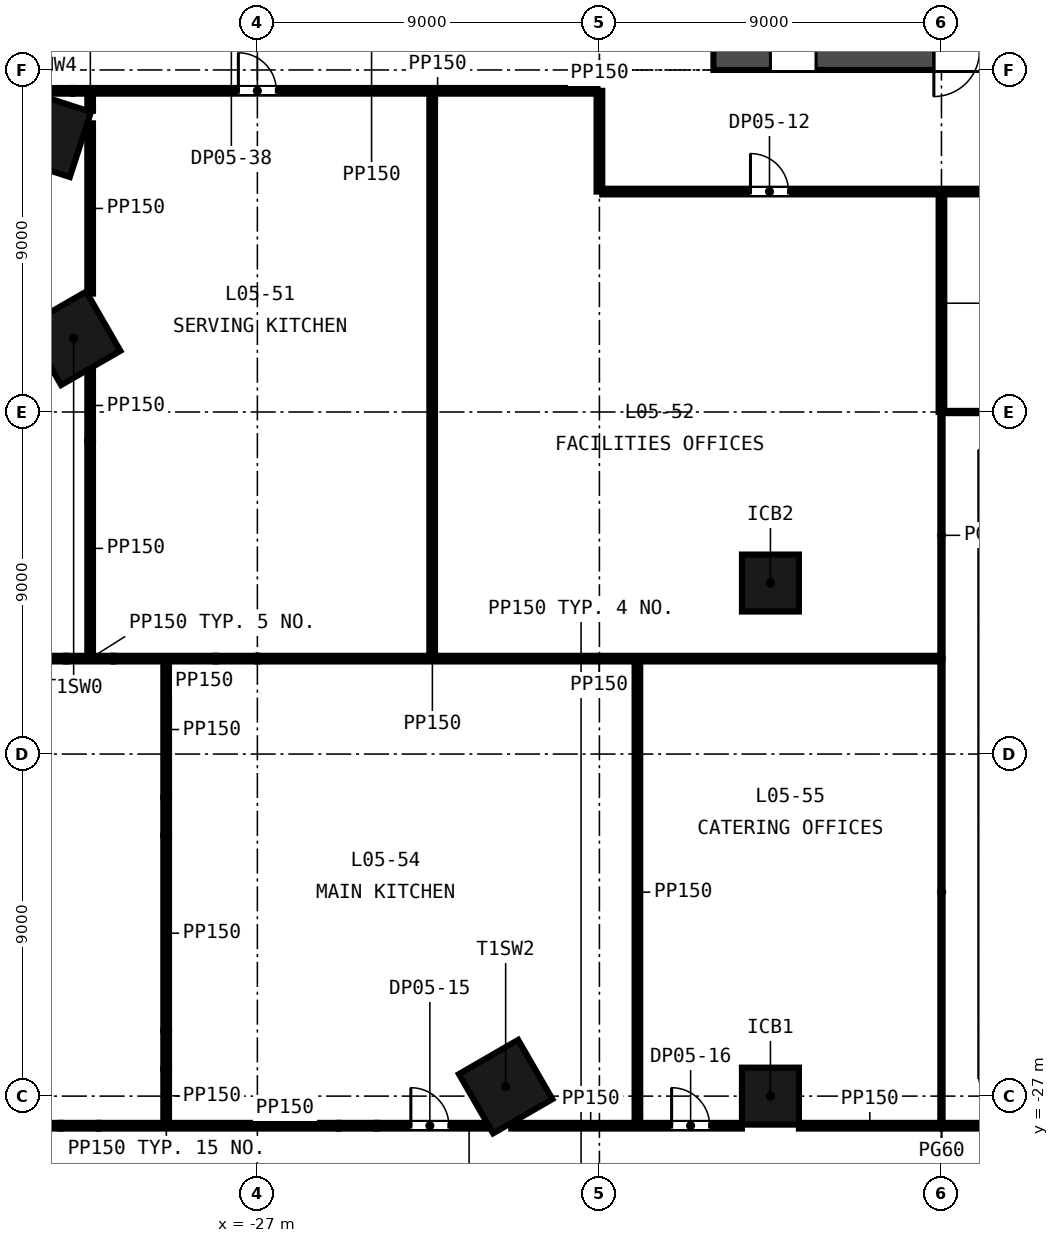
"""IFC4 building model, lengths in metres.
Left out: names, types, materials, properties, quantities, classifications, styles, units other than length and angle.
Written with IfcOpenShell. Run it as: python <this file> out.ifc"""

import sys

from ifc_helpers import new_model, si_unit, direction, frame, frame_2d, origin, origin_2d, place, context, subcontext, project, spatial, rectangle, extrude, element, fill, save


model = new_model("IFC4")
c1 = context("Model", 3, precision=1e-05, world=origin(), true_north=direction((0.0, 1.0)))
c2 = subcontext(c1, "Body", "Model", "MODEL_VIEW")
j1 = project(units=[si_unit("LENGTHUNIT", "METRE"), si_unit("PLANEANGLEUNIT", "RADIAN")], contexts=[c1])
p1 = place(None, origin())
s1 = spatial("IfcSite", under=j1, at=p1, CompositionType="ELEMENT")
p2 = place(p1, origin())
s2 = spatial("IfcBuilding", under=s1, at=p2, CompositionType="ELEMENT")
p3 = place(p2, frame((0.0, 0.0, 31.5)))
s3 = spatial("IfcBuildingStorey", under=s2, at=p3, CompositionType="ELEMENT", Elevation=31.5)
p4 = place(p3, frame((-15.0, 0.5, -0.3), z_axis=(0.0, 0.0, 1.0), x_axis=(1.0, 0.0, 0.0)))
e1 = element("IfcWall", 1, at=p4, inside=s3, PredefinedType="SOLIDWALL", context=c2, shape_type="SweptSolid", body=[
    extrude(rectangle(XDim=30.0, YDim=1.0, at=frame_2d((15.0, 0.0))), origin(), (0.0, 0.0, 1.0), 4.65),
])
p5 = place(p4, frame((5.8, 0.0, 0.3)))
e2 = element("IfcOpeningElement", 2, at=p5, cuts=e1, PredefinedType="OPENING", context=c2, shape_type="SweptSolid", body=[
    extrude(rectangle(XDim=2.4, YDim=2.4, at=frame_2d((1.2, 1.2))), frame((0.0, 0.51, 0.0), z_axis=(0.0, -1.0, 0.0), x_axis=(1.0, 0.0, 0.0)), (0.0, 0.0, 1.0), 1.02),
])
p6 = place(p4, frame((13.8, 0.0, 0.3)))
e3 = element("IfcOpeningElement", 3, at=p6, cuts=e1, PredefinedType="OPENING", context=c2, shape_type="SweptSolid", body=[
    extrude(rectangle(XDim=2.4, YDim=2.4, at=frame_2d((1.2, 1.2))), frame((0.0, 0.51, 0.0), z_axis=(0.0, -1.0, 0.0), x_axis=(1.0, 0.0, 0.0)), (0.0, 0.0, 1.0), 1.02),
])
p7 = place(p4, frame((21.8, 0.0, 0.3)))
e4 = element("IfcOpeningElement", 4, at=p7, cuts=e1, PredefinedType="OPENING", context=c2, shape_type="SweptSolid", body=[
    extrude(rectangle(XDim=2.4, YDim=2.4, at=frame_2d((1.2, 1.2))), frame((0.0, 0.51, 0.0), z_axis=(0.0, -1.0, 0.0), x_axis=(1.0, 0.0, 0.0)), (0.0, 0.0, 1.0), 1.02),
])
p8 = place(p4, frame((1.5, 0.0, 0.3)))
e5 = element("IfcOpeningElement", 5, at=p8, cuts=e1, PredefinedType="OPENING", context=c2, shape_type="SweptSolid", body=[
    extrude(rectangle(XDim=1.2, YDim=2.1, at=frame_2d((0.6, 1.05))), frame((0.0, 0.51, 0.0), z_axis=(0.0, -1.0, 0.0), x_axis=(1.0, 0.0, 0.0)), (0.0, 0.0, 1.0), 1.02),
])
p9 = place(p4, frame((27.3, 0.0, 0.3)))
e6 = element("IfcOpeningElement", 6, at=p9, cuts=e1, PredefinedType="OPENING", context=c2, shape_type="SweptSolid", body=[
    extrude(rectangle(XDim=1.2, YDim=2.1, at=frame_2d((0.6, 1.05))), frame((0.0, 0.51, 0.0), z_axis=(0.0, -1.0, 0.0), x_axis=(1.0, 0.0, 0.0)), (0.0, 0.0, 1.0), 1.02),
])
for number, where, z_axis, x_axis in (
    (7, (-32.512, -1.683, -0.3), (0.0, 0.0, 1.0), (-0.309, -0.951, 0.0)),
    (8, (-31.834, -7.061, -0.3), (0.0, 0.0, 1.0), (0.5, -0.866, 0.0)),
    (9, (-20.467, -26.75, -0.3), (0.0, 0.0, 1.0), (0.5, -0.866, 0.0)),
):
    element("IfcColumn", number, at=place(p3, frame(where, z_axis=z_axis, x_axis=x_axis)), inside=s3, PredefinedType="COLUMN", context=c2, shape_type="SweptSolid", body=[
        extrude(rectangle(XDim=1.8, YDim=1.8, at=origin_2d()), origin(), (0.0, 0.0, 1.0), 4.65),
    ])
for number, where, z_axis, x_axis in (
    (10, (-13.5, -27.0, -0.3), (0.0, 0.0, 1.0), (1.0, 0.0, 0.0)),
    (11, (-13.5, -13.5, -0.3), (0.0, 0.0, 1.0), (1.0, 0.0, 0.0)),
):
    element("IfcColumn", number, at=place(p3, frame(where, z_axis=z_axis, x_axis=x_axis)), inside=s3, PredefinedType="COLUMN", context=c2, shape_type="SweptSolid", body=[
        extrude(rectangle(XDim=1.5, YDim=1.5, at=origin_2d()), origin(), (0.0, 0.0, 1.0), 4.65),
    ])
p10 = place(p3, frame((-41.074, -27.779, 0.0), z_axis=(0.0, 0.0, 1.0), x_axis=(1.0, 0.0, 0.0)))
e12 = element("IfcWall", 12, at=p10, inside=s3, PredefinedType="PARTITIONING", context=c2, shape_type="SweptSolid", body=[
    extrude(rectangle(XDim=8.898, YDim=0.15, at=frame_2d((4.449, 0.0))), origin(), (0.0, 0.0, 1.0), 4.35),
])
p11 = place(p10, frame((4.65, 0.0, 0.0)))
e13 = element("IfcOpeningElement", 13, at=p11, cuts=e12, PredefinedType="OPENING", context=c2, shape_type="SweptSolid", body=[
    extrude(rectangle(XDim=1.8, YDim=2.4, at=frame_2d((0.9, 1.2))), frame((0.0, 0.085, 0.0), z_axis=(0.0, -1.0, 0.0), x_axis=(1.0, 0.0, 0.0)), (0.0, 0.0, 1.0), 0.17),
])
p12 = place(p3, frame((-32.176, -27.779, 0.0), z_axis=(0.0, 0.0, 1.0), x_axis=(1.0, 0.0, 0.0)))
e14 = element("IfcWall", 14, at=p12, inside=s3, PredefinedType="PARTITIONING", context=c2, shape_type="SweptSolid", body=[
    extrude(rectangle(XDim=1.0, YDim=0.15, at=frame_2d((0.5, 0.0))), origin(), (0.0, 0.0, 1.0), 3.261),
])
p13 = place(p3, frame((-31.176, -27.779, 0.0), z_axis=(0.0, 0.0, 1.0), x_axis=(1.0, 0.0, 0.0)))
e15 = element("IfcWall", 15, at=p13, inside=s3, PredefinedType="PARTITIONING", context=c2, shape_type="SweptSolid", body=[
    extrude(rectangle(XDim=6.314, YDim=0.15, at=frame_2d((3.157, 0.0))), origin(), (0.0, 0.0, 1.0), 4.35),
])
p14 = place(p3, frame((-24.862, -27.779, 0.0), z_axis=(0.0, 0.0, 1.0), x_axis=(1.0, 0.0, 0.0)))
e16 = element("IfcWall", 16, at=p14, inside=s3, PredefinedType="PARTITIONING", context=c2, shape_type="SweptSolid", body=[
    extrude(rectangle(XDim=1.0, YDim=0.15, at=frame_2d((0.5, 0.0))), origin(), (0.0, 0.0, 1.0), 3.436),
])
p15 = place(p3, frame((-23.862, -27.779, 0.0), z_axis=(0.0, 0.0, 1.0), x_axis=(1.0, 0.0, 0.0)))
e17 = element("IfcWall", 17, at=p15, inside=s3, PredefinedType="PARTITIONING", context=c2, shape_type="SweptSolid", body=[
    extrude(rectangle(XDim=2.906, YDim=0.15, at=frame_2d((1.453, 0.0))), origin(), (0.0, 0.0, 1.0), 4.35),
])
p16 = place(p15, frame((0.9, 0.0, 0.0)))
e18 = element("IfcOpeningElement", 18, at=p16, cuts=e17, PredefinedType="OPENING", context=c2, shape_type="SweptSolid", body=[
    extrude(rectangle(XDim=1.0, YDim=2.1, at=frame_2d((0.5, 1.05))), frame((0.0, 0.085, 0.0), z_axis=(0.0, -1.0, 0.0), x_axis=(1.0, 0.0, 0.0)), (0.0, 0.0, 1.0), 0.17),
])
p17 = place(p3, frame((-20.319, -27.779, 0.0), z_axis=(0.0, 0.0, 1.0), x_axis=(1.0, 0.0, 0.0)))
e19 = element("IfcWall", 19, at=p17, inside=s3, PredefinedType="PARTITIONING", context=c2, shape_type="SweptSolid", body=[
    extrude(rectangle(XDim=6.069, YDim=0.15, at=frame_2d((3.035, 0.0))), origin(), (0.0, 0.0, 1.0), 4.35),
])
p18 = place(p17, frame((4.219, 0.0, 0.0)))
e20 = element("IfcOpeningElement", 20, at=p18, cuts=e19, PredefinedType="OPENING", context=c2, shape_type="SweptSolid", body=[
    extrude(rectangle(XDim=1.0, YDim=2.1, at=frame_2d((0.5, 1.05))), frame((0.0, 0.085, 0.0), z_axis=(0.0, -1.0, 0.0), x_axis=(1.0, 0.0, 0.0)), (0.0, 0.0, 1.0), 0.17),
])
p19 = place(p3, frame((-12.75, -27.779, 0.0), z_axis=(0.0, 0.0, 1.0), x_axis=(1.0, 0.0, 0.0)))
e21 = element("IfcWall", 21, at=p19, inside=s3, PredefinedType="PARTITIONING", context=c2, shape_type="SweptSolid", body=[
    extrude(rectangle(XDim=3.72, YDim=0.15, at=frame_2d((1.86, 0.0))), origin(), (0.0, 0.0, 1.0), 4.35),
])
p20 = place(p3, frame((-8.97, -27.779, 0.0), z_axis=(0.0, 0.0, 1.0), x_axis=(1.0, 0.0, 0.0)))
e22 = element("IfcWall", 22, at=p20, inside=s3, PredefinedType="PARTITIONING", context=c2, shape_type="SweptSolid", body=[
    extrude(rectangle(XDim=8.22, YDim=0.15, at=frame_2d((4.11, 0.0))), origin(), (0.0, 0.0, 1.0), 4.35),
])
p21 = place(p3, frame((-44.932, -15.489, 0.0), z_axis=(0.0, 0.0, 1.0), x_axis=(1.0, 0.0, 0.0)))
e23 = element("IfcWall", 23, at=p21, inside=s3, PredefinedType="PARTITIONING", context=c2, shape_type="SweptSolid", body=[
    extrude(rectangle(XDim=12.901, YDim=0.15, at=frame_2d((6.451, 0.0))), origin(), (0.0, 0.0, 1.0), 4.35),
])
p22 = place(p3, frame((-32.031, -15.489, 0.0), z_axis=(0.0, 0.0, 1.0), x_axis=(1.0, 0.0, 0.0)))
e24 = element("IfcWall", 24, at=p22, inside=s3, PredefinedType="PARTITIONING", context=c2, shape_type="SweptSolid", body=[
    extrude(rectangle(XDim=1.244, YDim=0.15, at=frame_2d((0.622, 0.0))), origin(), (0.0, 0.0, 1.0), 3.261),
])
p23 = place(p3, frame((-30.787, -15.489, 0.0), z_axis=(0.0, 0.0, 1.0), x_axis=(1.0, 0.0, 0.0)))
e25 = element("IfcWall", 25, at=p23, inside=s3, PredefinedType="PARTITIONING", context=c2, shape_type="SweptSolid", body=[
    extrude(rectangle(XDim=2.692, YDim=0.15, at=frame_2d((1.346, 0.0))), origin(), (0.0, 0.0, 1.0), 4.35),
])
p24 = place(p3, frame((-28.094, -15.489, 0.0), z_axis=(0.0, 0.0, 1.0), x_axis=(1.0, 0.0, 0.0)))
e26 = element("IfcWall", 26, at=p24, inside=s3, PredefinedType="PARTITIONING", context=c2, shape_type="SweptSolid", body=[
    extrude(rectangle(XDim=1.097, YDim=0.15, at=frame_2d((0.548, 0.0))), origin(), (0.0, 0.0, 1.0), 3.5),
])
p25 = place(p3, frame((-26.998, -15.489, 0.0), z_axis=(0.0, 0.0, 1.0), x_axis=(1.0, 0.0, 0.0)))
e27 = element("IfcWall", 27, at=p25, inside=s3, PredefinedType="PARTITIONING", context=c2, shape_type="SweptSolid", body=[
    extrude(rectangle(XDim=17.968, YDim=0.15, at=frame_2d((8.984, 0.0))), origin(), (0.0, 0.0, 1.0), 4.35),
])
p26 = place(p3, frame((-8.925, -9.0, 0.0), z_axis=(0.0, 0.0, 1.0), x_axis=(1.0, 0.0, 0.0)))
e28 = element("IfcWall", 28, at=p26, inside=s3, PredefinedType="PARTITIONING", context=c2, shape_type="SweptSolid", body=[
    extrude(rectangle(XDim=6.3, YDim=0.06, at=frame_2d((3.15, 0.0))), origin(), (0.0, 0.0, 1.0), 4.35),
])
p27 = place(p3, frame((-17.925, -3.2, 0.0), z_axis=(0.0, 0.0, 1.0), x_axis=(1.0, 0.0, 0.0)))
e29 = element("IfcWall", 29, at=p27, inside=s3, PredefinedType="PARTITIONING", context=c2, shape_type="SweptSolid", body=[
    extrude(rectangle(XDim=50.906, YDim=0.15, at=frame_2d((25.453, 0.0))), origin(), (0.0, 0.0, 1.0), 4.35),
])
p28 = place(p27, frame((3.9, 0.0, 0.0)))
e30 = element("IfcOpeningElement", 30, at=p28, cuts=e29, PredefinedType="OPENING", context=c2, shape_type="SweptSolid", body=[
    extrude(rectangle(XDim=1.0, YDim=2.1, at=frame_2d((0.5, 1.05))), frame((0.0, 0.085, 0.0), z_axis=(0.0, -1.0, 0.0), x_axis=(1.0, 0.0, 0.0)), (0.0, 0.0, 1.0), 0.17),
])
p29 = place(p27, frame((28.575, 0.0, 0.0)))
e31 = element("IfcOpeningElement", 31, at=p29, cuts=e29, PredefinedType="OPENING", context=c2, shape_type="SweptSolid", body=[
    extrude(rectangle(XDim=1.0, YDim=2.1, at=frame_2d((0.5, 1.05))), frame((0.0, 0.085, 0.0), z_axis=(0.0, -1.0, 0.0), x_axis=(1.0, 0.0, 0.0)), (0.0, 0.0, 1.0), 0.17),
])
p30 = place(p27, frame((42.825, 0.0, 0.0)))
e32 = element("IfcOpeningElement", 32, at=p30, cuts=e29, PredefinedType="OPENING", context=c2, shape_type="SweptSolid", body=[
    extrude(rectangle(XDim=1.0, YDim=2.1, at=frame_2d((0.5, 1.05))), frame((0.0, 0.085, 0.0), z_axis=(0.0, -1.0, 0.0), x_axis=(1.0, 0.0, 0.0)), (0.0, 0.0, 1.0), 0.17),
])
p31 = place(p27, frame((11.575, 0.0, 0.0)))
e33 = element("IfcOpeningElement", 33, at=p31, cuts=e29, PredefinedType="OPENING", context=c2, shape_type="SweptSolid", body=[
    extrude(rectangle(XDim=1.0, YDim=2.1, at=frame_2d((0.5, 1.05))), frame((0.0, 0.085, 0.0), z_axis=(0.0, -1.0, 0.0), x_axis=(1.0, 0.0, 0.0)), (0.0, 0.0, 1.0), 0.17),
])
p32 = place(p27, frame((18.025, 0.0, 0.0)))
e34 = element("IfcOpeningElement", 34, at=p32, cuts=e29, PredefinedType="OPENING", context=c2, shape_type="SweptSolid", body=[
    extrude(rectangle(XDim=1.0, YDim=2.1, at=frame_2d((0.5, 1.05))), frame((0.0, 0.085, 0.0), z_axis=(0.0, -1.0, 0.0), x_axis=(1.0, 0.0, 0.0)), (0.0, 0.0, 1.0), 0.17),
])
p33 = place(p27, frame((22.725, 0.0, 0.0)))
e35 = element("IfcOpeningElement", 35, at=p33, cuts=e29, PredefinedType="OPENING", context=c2, shape_type="SweptSolid", body=[
    extrude(rectangle(XDim=1.0, YDim=2.1, at=frame_2d((0.5, 1.05))), frame((0.0, 0.085, 0.0), z_axis=(0.0, -1.0, 0.0), x_axis=(1.0, 0.0, 0.0)), (0.0, 0.0, 1.0), 0.17),
])
p34 = place(p27, frame((25.475, 0.0, 0.0)))
e36 = element("IfcOpeningElement", 36, at=p34, cuts=e29, PredefinedType="OPENING", context=c2, shape_type="SweptSolid", body=[
    extrude(rectangle(XDim=1.0, YDim=2.1, at=frame_2d((0.5, 1.05))), frame((0.0, 0.085, 0.0), z_axis=(0.0, -1.0, 0.0), x_axis=(1.0, 0.0, 0.0)), (0.0, 0.0, 1.0), 0.17),
])
p35 = place(p3, frame((-32.859, -0.549, 0.0), z_axis=(0.0, 0.0, 1.0), x_axis=(1.0, 0.0, 0.0)))
e37 = element("IfcWall", 37, at=p35, inside=s3, PredefinedType="PARTITIONING", context=c2, shape_type="SweptSolid", body=[
    extrude(rectangle(XDim=1.0, YDim=0.15, at=frame_2d((0.5, 0.0))), origin(), (0.0, 0.0, 1.0), 3.5),
])
p36 = place(p3, frame((-31.859, -0.549, 0.0), z_axis=(0.0, 0.0, 1.0), x_axis=(1.0, 0.0, 0.0)))
e38 = element("IfcWall", 38, at=p36, inside=s3, PredefinedType="PARTITIONING", context=c2, shape_type="SweptSolid", body=[
    extrude(rectangle(XDim=13.784, YDim=0.15, at=frame_2d((6.892, 0.0))), origin(), (0.0, 0.0, 1.0), 4.35),
])
p37 = place(p36, frame((4.359, 0.0, 0.0)))
e39 = element("IfcOpeningElement", 39, at=p37, cuts=e38, PredefinedType="OPENING", context=c2, shape_type="SweptSolid", body=[
    extrude(rectangle(XDim=1.0, YDim=2.1, at=frame_2d((0.5, 1.05))), frame((0.0, 0.085, 0.0), z_axis=(0.0, -1.0, 0.0), x_axis=(1.0, 0.0, 0.0)), (0.0, 0.0, 1.0), 0.17),
])
p38 = place(p3, frame((-31.4, -15.414, 0.0), z_axis=(0.0, 0.0, 1.0), x_axis=(0.0, 1.0, 0.0)))
e40 = element("IfcWall", 40, at=p38, inside=s3, PredefinedType="PARTITIONING", context=c2, shape_type="SweptSolid", body=[
    extrude(rectangle(XDim=5.65, YDim=0.15, at=frame_2d((2.825, 0.0))), origin(), (0.0, 0.0, 1.0), 4.35),
])
p39 = place(p3, frame((-31.4, -9.764, 0.0), z_axis=(0.0, 0.0, 1.0), x_axis=(0.0, 1.0, 0.0)))
e41 = element("IfcWall", 41, at=p39, inside=s3, PredefinedType="PARTITIONING", context=c2, shape_type="SweptSolid", body=[
    extrude(rectangle(XDim=1.871, YDim=0.15, at=frame_2d((0.935, 0.0))), origin(), (0.0, 0.0, 1.0), 3.5),
])
p40 = place(p3, frame((-31.4, -5.884, 0.0), z_axis=(0.0, 0.0, 1.0), x_axis=(0.0, 1.0, 0.0)))
e42 = element("IfcWall", 42, at=p40, inside=s3, PredefinedType="PARTITIONING", context=c2, shape_type="SweptSolid", body=[
    extrude(rectangle(XDim=4.48, YDim=0.15, at=frame_2d((2.24, 0.0))), origin(), (0.0, 0.0, 1.0), 4.35),
])
p41 = place(p3, frame((-31.4, -1.074, 0.0), z_axis=(0.0, 0.0, 1.0), x_axis=(0.0, 1.0, 0.0)))
e43 = element("IfcWall", 43, at=p41, inside=s3, PredefinedType="PARTITIONING", context=c2, shape_type="SweptSolid", body=[
    extrude(rectangle(XDim=0.45, YDim=0.15, at=frame_2d((0.225, 0.0))), origin(), (0.0, 0.0, 1.0), 4.35),
])
p42 = place(p3, frame((-29.4, -27.704, 0.0), z_axis=(0.0, 0.0, 1.0), x_axis=(0.0, 1.0, 0.0)))
e44 = element("IfcWall", 44, at=p42, inside=s3, PredefinedType="PARTITIONING", context=c2, shape_type="SweptSolid", body=[
    extrude(rectangle(XDim=1.421, YDim=0.15, at=frame_2d((0.71, 0.0))), origin(), (0.0, 0.0, 1.0), 4.35),
])
p43 = place(p3, frame((-29.4, -26.283, 0.0), z_axis=(0.0, 0.0, 1.0), x_axis=(0.0, 1.0, 0.0)))
e45 = element("IfcWall", 45, at=p43, inside=s3, PredefinedType="PARTITIONING", context=c2, shape_type="SweptSolid", body=[
    extrude(rectangle(XDim=1.0, YDim=0.15, at=frame_2d((0.5, 0.0))), origin(), (0.0, 0.0, 1.0), 3.261),
])
p44 = place(p3, frame((-29.4, -25.283, 0.0), z_axis=(0.0, 0.0, 1.0), x_axis=(0.0, 1.0, 0.0)))
e46 = element("IfcWall", 46, at=p44, inside=s3, PredefinedType="PARTITIONING", context=c2, shape_type="SweptSolid", body=[
    extrude(rectangle(XDim=5.139, YDim=0.15, at=frame_2d((2.569, 0.0))), origin(), (0.0, 0.0, 1.0), 4.35),
])
p45 = place(p3, frame((-29.4, -20.145, 0.0), z_axis=(0.0, 0.0, 1.0), x_axis=(0.0, 1.0, 0.0)))
e47 = element("IfcWall", 47, at=p45, inside=s3, PredefinedType="PARTITIONING", context=c2, shape_type="SweptSolid", body=[
    extrude(rectangle(XDim=1.0, YDim=0.15, at=frame_2d((0.5, 0.0))), origin(), (0.0, 0.0, 1.0), 3.261),
])
p46 = place(p3, frame((-29.4, -19.145, 0.0), z_axis=(0.0, 0.0, 1.0), x_axis=(0.0, 1.0, 0.0)))
e48 = element("IfcWall", 48, at=p46, inside=s3, PredefinedType="PARTITIONING", context=c2, shape_type="SweptSolid", body=[
    extrude(rectangle(XDim=3.581, YDim=0.15, at=frame_2d((1.79, 0.0))), origin(), (0.0, 0.0, 1.0), 4.35),
])
p47 = place(p3, frame((-22.4, -15.414, 0.0), z_axis=(0.0, 0.0, 1.0), x_axis=(0.0, 1.0, 0.0)))
e49 = element("IfcWall", 49, at=p47, inside=s3, PredefinedType="PARTITIONING", context=c2, shape_type="SweptSolid", body=[
    extrude(rectangle(XDim=14.79, YDim=0.15, at=frame_2d((7.395, 0.0))), origin(), (0.0, 0.0, 1.0), 4.35),
])
p48 = place(p3, frame((-18.0, -3.2, 0.0), z_axis=(0.0, 0.0, 1.0), x_axis=(0.0, 1.0, 0.0)))
e50 = element("IfcWall", 50, at=p48, inside=s3, PredefinedType="PARTITIONING", context=c2, shape_type="SweptSolid", body=[
    extrude(rectangle(XDim=2.651, YDim=0.15, at=frame_2d((1.326, 0.0))), origin(), (0.0, 0.0, 1.0), 4.35),
])
p49 = place(p3, frame((-17.0, -27.704, 0.0), z_axis=(0.0, 0.0, 1.0), x_axis=(0.0, 1.0, 0.0)))
e51 = element("IfcWall", 51, at=p49, inside=s3, PredefinedType="PARTITIONING", context=c2, shape_type="SweptSolid", body=[
    extrude(rectangle(XDim=12.14, YDim=0.15, at=frame_2d((6.07, 0.0))), origin(), (0.0, 0.0, 1.0), 4.35),
])
p50 = place(p3, frame((-9.0, -27.778, 0.0), z_axis=(0.0, 0.0, 1.0), x_axis=(0.0, 1.0, 0.0)))
e52 = element("IfcWall", 52, at=p50, inside=s3, PredefinedType="PARTITIONING", context=c2, shape_type="SweptSolid", body=[
    extrude(rectangle(XDim=12.288, YDim=0.06, at=frame_2d((6.144, 0.0))), origin(), (0.0, 0.0, 1.0), 4.35),
])
p51 = place(p3, frame((-9.0, -15.489, 0.0), z_axis=(0.0, 0.0, 1.0), x_axis=(0.0, 1.0, 0.0)))
e53 = element("IfcWall", 53, at=p51, inside=s3, PredefinedType="PARTITIONING", context=c2, shape_type="SweptSolid", body=[
    extrude(rectangle(XDim=6.488, YDim=0.06, at=frame_2d((3.244, 0.0))), origin(), (0.0, 0.0, 1.0), 4.35),
])
p52 = place(p3, frame((-9.0, -9.0, 0.0), z_axis=(0.0, 0.0, 1.0), x_axis=(0.0, 1.0, 0.0)))
e54 = element("IfcWall", 54, at=p52, inside=s3, PredefinedType="PARTITIONING", context=c2, shape_type="SweptSolid", body=[
    extrude(rectangle(XDim=5.725, YDim=0.15, at=frame_2d((2.863, 0.0))), origin(), (0.0, 0.0, 1.0), 4.35),
])
p53 = place(p37, origin())
e55 = element("IfcDoor", 55, at=p53, inside=s3, OperationType="SINGLE_SWING_LEFT", PredefinedType="DOOR", context=c2, shape_type="SweptSolid", body=[
    extrude(rectangle(XDim=1.0, YDim=2.1, at=frame_2d((0.5, 1.05))), frame((0.0, 0.025, 0.0), z_axis=(0.0, -1.0, 0.0), x_axis=(1.0, 0.0, 0.0)), (0.0, 0.0, 1.0), 0.05),
])
fill(e39, e55)
p54 = place(p28, origin())
e56 = element("IfcDoor", 56, at=p54, inside=s3, OperationType="SINGLE_SWING_LEFT", PredefinedType="DOOR", context=c2, shape_type="SweptSolid", body=[
    extrude(rectangle(XDim=1.0, YDim=2.1, at=frame_2d((0.5, 1.05))), frame((0.0, 0.025, 0.0), z_axis=(0.0, -1.0, 0.0), x_axis=(1.0, 0.0, 0.0)), (0.0, 0.0, 1.0), 0.05),
])
fill(e30, e56)
p55 = place(p16, origin())
e57 = element("IfcDoor", 57, at=p55, inside=s3, OperationType="SINGLE_SWING_LEFT", PredefinedType="DOOR", context=c2, shape_type="SweptSolid", body=[
    extrude(rectangle(XDim=1.0, YDim=2.1, at=frame_2d((0.5, 1.05))), frame((0.0, 0.025, 0.0), z_axis=(0.0, -1.0, 0.0), x_axis=(1.0, 0.0, 0.0)), (0.0, 0.0, 1.0), 0.05),
])
fill(e18, e57)
p56 = place(p18, origin())
e58 = element("IfcDoor", 58, at=p56, inside=s3, OperationType="SINGLE_SWING_LEFT", PredefinedType="DOOR", context=c2, shape_type="SweptSolid", body=[
    extrude(rectangle(XDim=1.0, YDim=2.1, at=frame_2d((0.5, 1.05))), frame((0.0, 0.025, 0.0), z_axis=(0.0, -1.0, 0.0), x_axis=(1.0, 0.0, 0.0)), (0.0, 0.0, 1.0), 0.05),
])
fill(e20, e58)
save(model, sys.argv[1])
